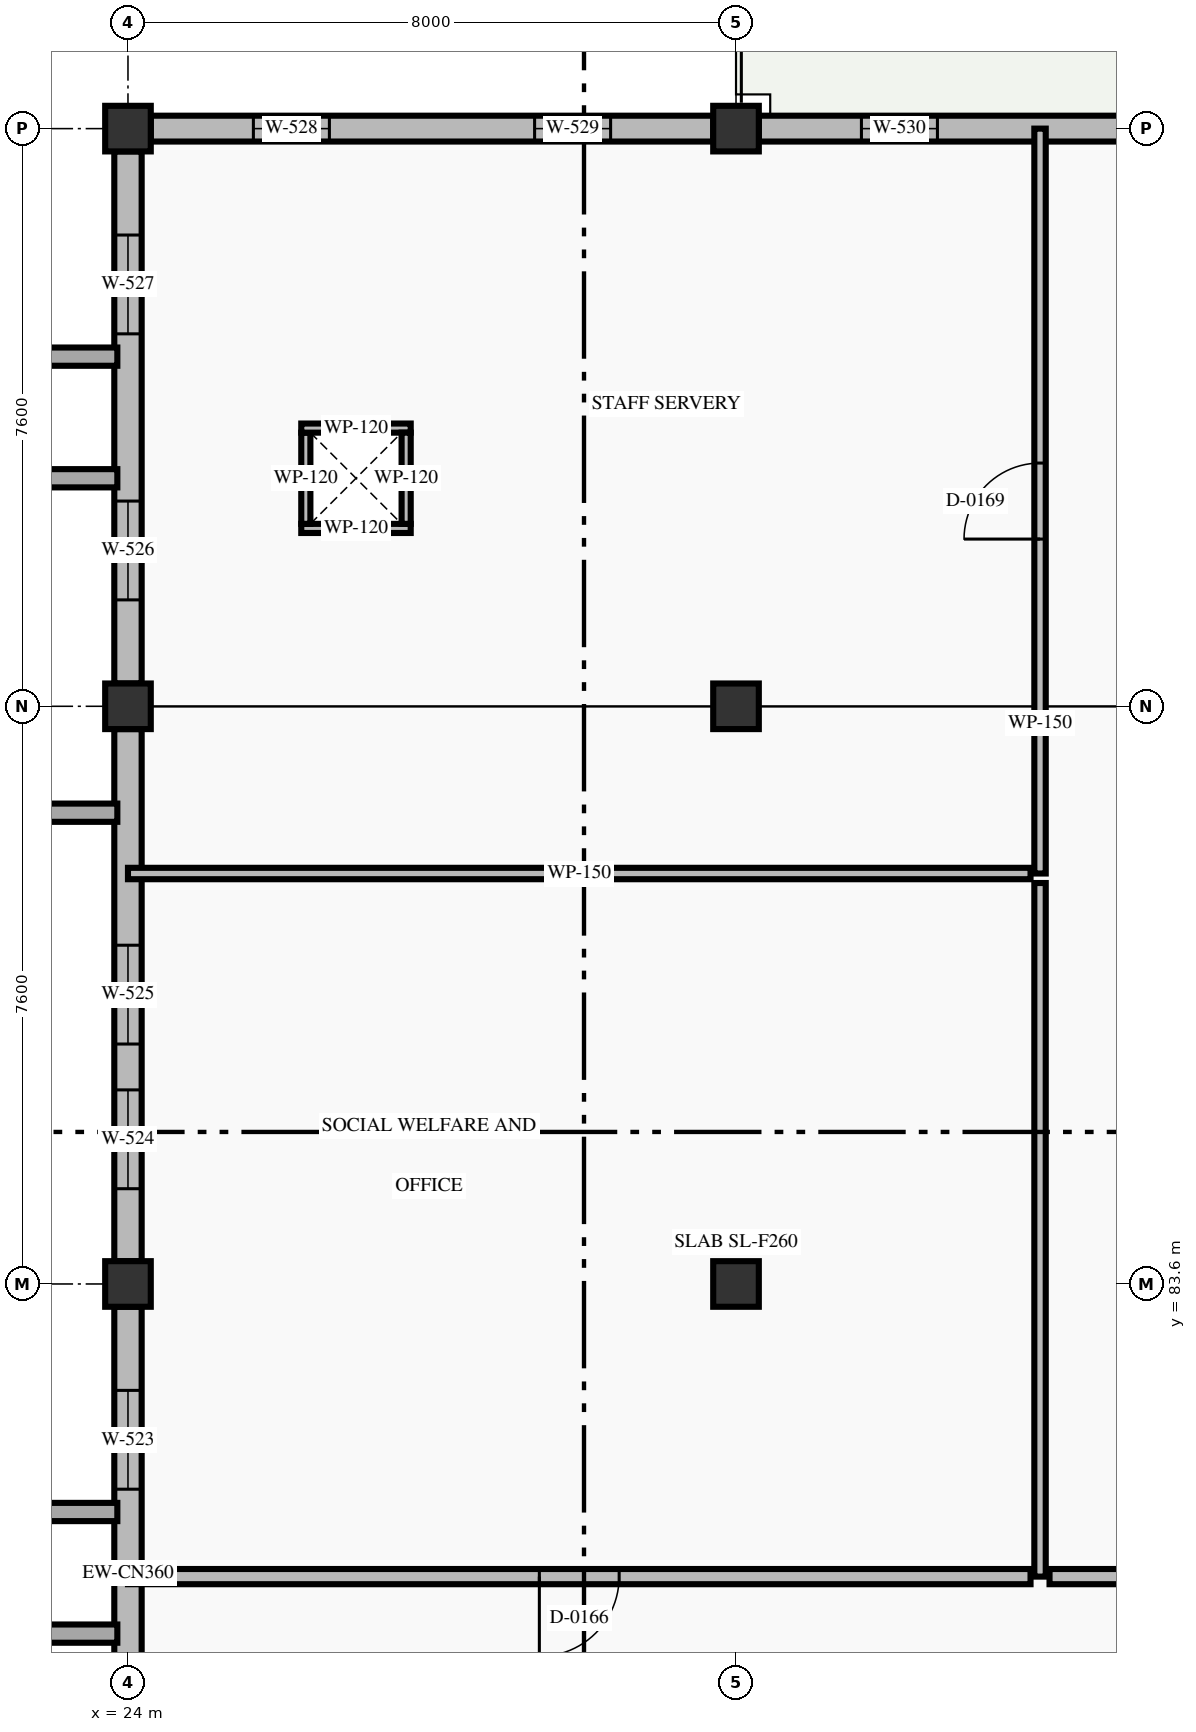
"""IFC4 building model, lengths in metres.
Left out: names, types, materials, properties, quantities, classifications, styles, units other than length and angle.
Written with IfcOpenShell. Run it as: python <this file> out.ifc"""

import sys

from ifc_helpers import new_model, si_unit, direction, frame, frame_2d, origin, origin_2d, place, context, subcontext, project, spatial, rectangle, extrude, element, fill, save


model = new_model("IFC4")
c1 = context("Model", 3, precision=1e-05, world=origin(), true_north=direction((0.0, 1.0)))
c2 = subcontext(c1, "Body", "Model", "MODEL_VIEW")
j1 = project(units=[si_unit("LENGTHUNIT", "METRE"), si_unit("PLANEANGLEUNIT", "RADIAN")], contexts=[c1])
p1 = place(None, origin())
s1 = spatial("IfcSite", under=j1, at=p1, CompositionType="ELEMENT")
p2 = place(p1, origin())
s2 = spatial("IfcBuilding", under=s1, at=p2, CompositionType="ELEMENT")
p3 = place(p2, frame((0.0, 0.0, 18.9)))
s3 = spatial("IfcBuildingStorey", under=s2, at=p3, CompositionType="ELEMENT", Elevation=18.9)
for number, where, z_axis, x_axis in (
    (1, (24.0, 83.6, 0.0), (0.0, 0.0, 1.0), (1.0, 0.0, 0.0)),
    (2, (24.0, 91.2, 0.0), (0.0, 0.0, 1.0), (1.0, 0.0, 0.0)),
    (3, (24.0, 98.8, 0.0), (0.0, 0.0, 1.0), (1.0, 0.0, 0.0)),
    (4, (32.0, 83.6, 0.0), (0.0, 0.0, 1.0), (1.0, 0.0, 0.0)),
    (5, (32.0, 91.2, 0.0), (0.0, 0.0, 1.0), (1.0, 0.0, 0.0)),
    (6, (32.0, 98.8, 0.0), (0.0, 0.0, 1.0), (1.0, 0.0, 0.0)),
):
    element("IfcColumn", number, at=place(p3, frame(where, z_axis=z_axis, x_axis=x_axis)), inside=s3, PredefinedType="COLUMN", context=c2, shape_type="SweptSolid", body=[
        extrude(rectangle(XDim=0.6, YDim=0.6, at=origin_2d()), origin(), (0.0, 0.0, 1.0), 4.8),
    ])
p4 = place(p3, frame((24.0, 76.3, 0.0), z_axis=(0.0, 0.0, 1.0), x_axis=(0.0, 1.0, 0.0)))
e7 = element("IfcWall", 7, at=p4, inside=s3, PredefinedType="STANDARD", context=c2, shape_type="SweptSolid", body=[
    extrude(rectangle(XDim=7.0, YDim=0.36, at=frame_2d((3.5, 0.0))), origin(), (0.0, 0.0, 1.0), 3.97),
])
p5 = place(p4, frame((1.1, 0.0, 0.9)))
e8 = element("IfcOpeningElement", 8, at=p5, cuts=e7, PredefinedType="OPENING", context=c2, shape_type="SweptSolid", body=[
    extrude(rectangle(XDim=1.3, YDim=1.75, at=frame_2d((0.65, 0.875))), frame((0.0, 0.19, 0.0), z_axis=(0.0, -1.0, 0.0), x_axis=(1.0, 0.0, 0.0)), (0.0, 0.0, 1.0), 0.38),
])
p6 = place(p4, frame((4.6, 0.0, 0.9)))
e9 = element("IfcOpeningElement", 9, at=p6, cuts=e7, PredefinedType="OPENING", context=c2, shape_type="SweptSolid", body=[
    extrude(rectangle(XDim=1.3, YDim=1.75, at=frame_2d((0.65, 0.875))), frame((0.0, 0.19, 0.0), z_axis=(0.0, -1.0, 0.0), x_axis=(1.0, 0.0, 0.0)), (0.0, 0.0, 1.0), 0.38),
])
p7 = place(p3, frame((24.0, 83.9, 0.0), z_axis=(0.0, 0.0, 1.0), x_axis=(0.0, 1.0, 0.0)))
e10 = element("IfcWall", 10, at=p7, inside=s3, PredefinedType="STANDARD", context=c2, shape_type="SweptSolid", body=[
    extrude(rectangle(XDim=7.0, YDim=0.36, at=frame_2d((3.5, 0.0))), origin(), (0.0, 0.0, 1.0), 3.97),
])
p8 = place(p7, frame((0.953, 0.0, 0.9)))
e11 = element("IfcOpeningElement", 11, at=p8, cuts=e10, PredefinedType="OPENING", context=c2, shape_type="SweptSolid", body=[
    extrude(rectangle(XDim=1.3, YDim=1.75, at=frame_2d((0.65, 0.875))), frame((0.0, 0.19, 0.0), z_axis=(0.0, -1.0, 0.0), x_axis=(1.0, 0.0, 0.0)), (0.0, 0.0, 1.0), 0.38),
])
p9 = place(p7, frame((2.857, 0.0, 0.9)))
e12 = element("IfcOpeningElement", 12, at=p9, cuts=e10, PredefinedType="OPENING", context=c2, shape_type="SweptSolid", body=[
    extrude(rectangle(XDim=1.3, YDim=1.75, at=frame_2d((0.65, 0.875))), frame((0.0, 0.19, 0.0), z_axis=(0.0, -1.0, 0.0), x_axis=(1.0, 0.0, 0.0)), (0.0, 0.0, 1.0), 0.38),
])
p10 = place(p3, frame((24.0, 91.5, 0.0), z_axis=(0.0, 0.0, 1.0), x_axis=(0.0, 1.0, 0.0)))
e13 = element("IfcWall", 13, at=p10, inside=s3, PredefinedType="STANDARD", context=c2, shape_type="SweptSolid", body=[
    extrude(rectangle(XDim=7.0, YDim=0.36, at=frame_2d((3.5, 0.0))), origin(), (0.0, 0.0, 1.0), 3.97),
])
p11 = place(p10, frame((1.1, 0.0, 0.9)))
e14 = element("IfcOpeningElement", 14, at=p11, cuts=e13, PredefinedType="OPENING", context=c2, shape_type="SweptSolid", body=[
    extrude(rectangle(XDim=1.3, YDim=1.75, at=frame_2d((0.65, 0.875))), frame((0.0, 0.19, 0.0), z_axis=(0.0, -1.0, 0.0), x_axis=(1.0, 0.0, 0.0)), (0.0, 0.0, 1.0), 0.38),
])
p12 = place(p10, frame((4.6, 0.0, 0.9)))
e15 = element("IfcOpeningElement", 15, at=p12, cuts=e13, PredefinedType="OPENING", context=c2, shape_type="SweptSolid", body=[
    extrude(rectangle(XDim=1.3, YDim=1.75, at=frame_2d((0.65, 0.875))), frame((0.0, 0.19, 0.0), z_axis=(0.0, -1.0, 0.0), x_axis=(1.0, 0.0, 0.0)), (0.0, 0.0, 1.0), 0.38),
])
p13 = place(p3, frame((24.3, 98.8, 0.0), z_axis=(0.0, 0.0, 1.0), x_axis=(1.0, 0.0, 0.0)))
e16 = element("IfcWall", 16, at=p13, inside=s3, PredefinedType="STANDARD", context=c2, shape_type="SweptSolid", body=[
    extrude(rectangle(XDim=7.4, YDim=0.34, at=frame_2d((3.7, 0.0))), origin(), (0.0, 0.0, 1.0), 3.92),
])
p14 = place(p13, frame((1.35, 0.0, 1.05)))
e17 = element("IfcOpeningElement", 17, at=p14, cuts=e16, PredefinedType="OPENING", context=c2, shape_type="SweptSolid", body=[
    extrude(rectangle(XDim=1.0, YDim=1.35, at=frame_2d((0.5, 0.675))), frame((0.0, 0.18, 0.0), z_axis=(0.0, -1.0, 0.0), x_axis=(1.0, 0.0, 0.0)), (0.0, 0.0, 1.0), 0.36),
])
p15 = place(p13, frame((5.05, 0.0, 1.05)))
e18 = element("IfcOpeningElement", 18, at=p15, cuts=e16, PredefinedType="OPENING", context=c2, shape_type="SweptSolid", body=[
    extrude(rectangle(XDim=1.0, YDim=1.35, at=frame_2d((0.5, 0.675))), frame((0.0, 0.18, 0.0), z_axis=(0.0, -1.0, 0.0), x_axis=(1.0, 0.0, 0.0)), (0.0, 0.0, 1.0), 0.36),
])
p16 = place(p3, frame((32.3, 98.8, 0.0), z_axis=(0.0, 0.0, 1.0), x_axis=(1.0, 0.0, 0.0)))
e19 = element("IfcWall", 19, at=p16, inside=s3, PredefinedType="STANDARD", context=c2, shape_type="SweptSolid", body=[
    extrude(rectangle(XDim=7.4, YDim=0.34, at=frame_2d((3.7, 0.0))), origin(), (0.0, 0.0, 1.0), 3.92),
])
p17 = place(p16, frame((1.35, 0.0, 1.05)))
e20 = element("IfcOpeningElement", 20, at=p17, cuts=e19, PredefinedType="OPENING", context=c2, shape_type="SweptSolid", body=[
    extrude(rectangle(XDim=1.0, YDim=1.35, at=frame_2d((0.5, 0.675))), frame((0.0, 0.18, 0.0), z_axis=(0.0, -1.0, 0.0), x_axis=(1.0, 0.0, 0.0)), (0.0, 0.0, 1.0), 0.36),
])
p18 = place(p16, frame((5.05, 0.0, 1.05)))
e21 = element("IfcOpeningElement", 21, at=p18, cuts=e19, PredefinedType="OPENING", context=c2, shape_type="SweptSolid", body=[
    extrude(rectangle(XDim=1.0, YDim=1.35, at=frame_2d((0.5, 0.675))), frame((0.0, 0.18, 0.0), z_axis=(0.0, -1.0, 0.0), x_axis=(1.0, 0.0, 0.0)), (0.0, 0.0, 1.0), 0.36),
])
p19 = place(p3, frame((27.72, 93.54, 0.0), z_axis=(0.0, 0.0, 1.0), x_axis=(-1.0, 0.0, 0.0)))
e22 = element("IfcWall", 22, at=p19, inside=s3, PredefinedType="PARTITIONING", context=c2, shape_type="SweptSolid", body=[
    extrude(rectangle(XDim=1.44, YDim=0.12, at=frame_2d((0.72, 0.0))), origin(), (0.0, 0.0, 1.0), 4.57),
])
p20 = place(p3, frame((26.34, 93.6, 0.0), z_axis=(0.0, 0.0, 1.0), x_axis=(0.0, 1.0, 0.0)))
e23 = element("IfcWall", 23, at=p20, inside=s3, PredefinedType="PARTITIONING", context=c2, shape_type="SweptSolid", body=[
    extrude(rectangle(XDim=1.2, YDim=0.12, at=frame_2d((0.6, 0.0))), origin(), (0.0, 0.0, 1.0), 4.57),
])
p21 = place(p3, frame((26.28, 94.86, 0.0), z_axis=(0.0, 0.0, 1.0), x_axis=(1.0, 0.0, 0.0)))
e24 = element("IfcWall", 24, at=p21, inside=s3, PredefinedType="PARTITIONING", context=c2, shape_type="SweptSolid", body=[
    extrude(rectangle(XDim=1.44, YDim=0.12, at=frame_2d((0.72, 0.0))), origin(), (0.0, 0.0, 1.0), 4.57),
])
p22 = place(p3, frame((27.66, 94.8, 0.0), z_axis=(0.0, 0.0, 1.0), x_axis=(0.0, -1.0, 0.0)))
e25 = element("IfcWall", 25, at=p22, inside=s3, PredefinedType="PARTITIONING", context=c2, shape_type="SweptSolid", body=[
    extrude(rectangle(XDim=1.2, YDim=0.12, at=frame_2d((0.6, 0.0))), origin(), (0.0, 0.0, 1.0), 4.57),
])
p23 = place(p3, frame((36.0, 89.0, 0.0), z_axis=(0.0, 0.0, 1.0), x_axis=(0.0, 1.0, 0.0)))
e26 = element("IfcWall", 26, at=p23, inside=s3, PredefinedType="PARTITIONING", context=c2, shape_type="SweptSolid", body=[
    extrude(rectangle(XDim=9.8, YDim=0.15, at=frame_2d((4.9, 0.0))), origin(), (0.0, 0.0, 1.0), 4.07),
])
p24 = place(p23, frame((4.4, 0.0, 0.0)))
e27 = element("IfcOpeningElement", 27, at=p24, cuts=e26, PredefinedType="OPENING", context=c2, shape_type="SweptSolid", body=[
    extrude(rectangle(XDim=1.0, YDim=2.15, at=frame_2d((0.5, 1.075))), frame((0.0, 0.085, 0.0), z_axis=(0.0, -1.0, 0.0), x_axis=(1.0, 0.0, 0.0)), (0.0, 0.0, 1.0), 0.17),
])
p25 = place(p3, frame((36.0, 79.75, 0.0), z_axis=(0.0, 0.0, 1.0), x_axis=(0.0, 1.0, 0.0)))
e28 = element("IfcWall", 28, at=p25, inside=s3, PredefinedType="PARTITIONING", context=c2, shape_type="SweptSolid", body=[
    extrude(rectangle(XDim=9.125, YDim=0.15, at=frame_2d((4.562, 0.0))), origin(), (0.0, 0.0, 1.0), 4.07),
])
p26 = place(p3, frame((48.47, 79.75, 0.0), z_axis=(0.0, 0.0, 1.0), x_axis=(-1.0, 0.0, 0.0)))
e29 = element("IfcWall", 29, at=p26, inside=s3, PredefinedType="STANDARD", context=c2, shape_type="SweptSolid", body=[
    extrude(rectangle(XDim=12.345, YDim=0.2, at=frame_2d((6.172, 0.0))), origin(), (0.0, 0.0, 1.0), 4.57),
])
p27 = place(p26, frame((5.333, 0.0, 0.0)))
e30 = element("IfcOpeningElement", 30, at=p27, cuts=e29, PredefinedType="OPENING", context=c2, shape_type="SweptSolid", body=[
    extrude(rectangle(XDim=1.68, YDim=2.34, at=frame_2d((0.84, 1.17))), frame((0.0, 0.11, 0.0), z_axis=(0.0, -1.0, 0.0), x_axis=(1.0, 0.0, 0.0)), (0.0, 0.0, 1.0), 0.22),
])
p28 = place(p26, frame((7.333, 0.0, 0.0)))
e31 = element("IfcOpeningElement", 31, at=p28, cuts=e29, PredefinedType="OPENING", context=c2, shape_type="SweptSolid", body=[
    extrude(rectangle(XDim=1.68, YDim=2.34, at=frame_2d((0.84, 1.17))), frame((0.0, 0.11, 0.0), z_axis=(0.0, -1.0, 0.0), x_axis=(1.0, 0.0, 0.0)), (0.0, 0.0, 1.0), 0.22),
])
p29 = place(p3, frame((35.875, 89.0, 0.0), z_axis=(0.0, 0.0, 1.0), x_axis=(-1.0, 0.0, 0.0)))
e32 = element("IfcWall", 32, at=p29, inside=s3, PredefinedType="PARTITIONING", context=c2, shape_type="SweptSolid", body=[
    extrude(rectangle(XDim=11.875, YDim=0.15, at=frame_2d((5.938, 0.0))), origin(), (0.0, 0.0, 1.0), 4.57),
])
p30 = place(p3, frame((35.875, 79.75, 0.0), z_axis=(0.0, 0.0, 1.0), x_axis=(-1.0, 0.0, 0.0)))
e33 = element("IfcWall", 33, at=p30, inside=s3, PredefinedType="STANDARD", context=c2, shape_type="SweptSolid", body=[
    extrude(rectangle(XDim=11.875, YDim=0.2, at=frame_2d((5.938, 0.0))), origin(), (0.0, 0.0, 1.0), 4.57),
])
p31 = place(p30, frame((5.413, 0.0, 0.0)))
e34 = element("IfcOpeningElement", 34, at=p31, cuts=e33, PredefinedType="OPENING", context=c2, shape_type="SweptSolid", body=[
    extrude(rectangle(XDim=1.05, YDim=2.15, at=frame_2d((0.525, 1.075))), frame((0.0, 0.11, 0.0), z_axis=(0.0, -1.0, 0.0), x_axis=(1.0, 0.0, 0.0)), (0.0, 0.0, 1.0), 0.22),
])
p32 = place(p6, origin())
e35 = element("IfcWindow", 35, at=p32, inside=s3, PartitioningType="SINGLE_PANEL", PredefinedType="WINDOW", context=c2, shape_type="SweptSolid", body=[
    extrude(rectangle(XDim=1.3, YDim=1.75, at=frame_2d((0.65, 0.875))), frame((0.0, 0.03, 0.0), z_axis=(0.0, -1.0, 0.0), x_axis=(1.0, 0.0, 0.0)), (0.0, 0.0, 1.0), 0.06),
])
fill(e9, e35)
p33 = place(p8, origin())
e36 = element("IfcWindow", 36, at=p33, inside=s3, PartitioningType="SINGLE_PANEL", PredefinedType="WINDOW", context=c2, shape_type="SweptSolid", body=[
    extrude(rectangle(XDim=1.3, YDim=1.75, at=frame_2d((0.65, 0.875))), frame((0.0, 0.03, 0.0), z_axis=(0.0, -1.0, 0.0), x_axis=(1.0, 0.0, 0.0)), (0.0, 0.0, 1.0), 0.06),
])
fill(e11, e36)
p34 = place(p9, origin())
e37 = element("IfcWindow", 37, at=p34, inside=s3, PartitioningType="SINGLE_PANEL", PredefinedType="WINDOW", context=c2, shape_type="SweptSolid", body=[
    extrude(rectangle(XDim=1.3, YDim=1.75, at=frame_2d((0.65, 0.875))), frame((0.0, 0.03, 0.0), z_axis=(0.0, -1.0, 0.0), x_axis=(1.0, 0.0, 0.0)), (0.0, 0.0, 1.0), 0.06),
])
fill(e12, e37)
p35 = place(p11, origin())
e38 = element("IfcWindow", 38, at=p35, inside=s3, PartitioningType="SINGLE_PANEL", PredefinedType="WINDOW", context=c2, shape_type="SweptSolid", body=[
    extrude(rectangle(XDim=1.3, YDim=1.75, at=frame_2d((0.65, 0.875))), frame((0.0, 0.03, 0.0), z_axis=(0.0, -1.0, 0.0), x_axis=(1.0, 0.0, 0.0)), (0.0, 0.0, 1.0), 0.06),
])
fill(e14, e38)
p36 = place(p12, origin())
e39 = element("IfcWindow", 39, at=p36, inside=s3, PartitioningType="SINGLE_PANEL", PredefinedType="WINDOW", context=c2, shape_type="SweptSolid", body=[
    extrude(rectangle(XDim=1.3, YDim=1.75, at=frame_2d((0.65, 0.875))), frame((0.0, 0.03, 0.0), z_axis=(0.0, -1.0, 0.0), x_axis=(1.0, 0.0, 0.0)), (0.0, 0.0, 1.0), 0.06),
])
fill(e15, e39)
p37 = place(p14, origin())
e40 = element("IfcWindow", 40, at=p37, inside=s3, PartitioningType="SINGLE_PANEL", PredefinedType="WINDOW", context=c2, shape_type="SweptSolid", body=[
    extrude(rectangle(XDim=1.0, YDim=1.35, at=frame_2d((0.5, 0.675))), frame((0.0, 0.03, 0.0), z_axis=(0.0, -1.0, 0.0), x_axis=(1.0, 0.0, 0.0)), (0.0, 0.0, 1.0), 0.06),
])
fill(e17, e40)
p38 = place(p15, origin())
e41 = element("IfcWindow", 41, at=p38, inside=s3, PartitioningType="SINGLE_PANEL", PredefinedType="WINDOW", context=c2, shape_type="SweptSolid", body=[
    extrude(rectangle(XDim=1.0, YDim=1.35, at=frame_2d((0.5, 0.675))), frame((0.0, 0.03, 0.0), z_axis=(0.0, -1.0, 0.0), x_axis=(1.0, 0.0, 0.0)), (0.0, 0.0, 1.0), 0.06),
])
fill(e18, e41)
p39 = place(p17, origin())
e42 = element("IfcWindow", 42, at=p39, inside=s3, PartitioningType="SINGLE_PANEL", PredefinedType="WINDOW", context=c2, shape_type="SweptSolid", body=[
    extrude(rectangle(XDim=1.0, YDim=1.35, at=frame_2d((0.5, 0.675))), frame((0.0, 0.03, 0.0), z_axis=(0.0, -1.0, 0.0), x_axis=(1.0, 0.0, 0.0)), (0.0, 0.0, 1.0), 0.06),
])
fill(e20, e42)
p40 = place(p31, origin())
e43 = element("IfcDoor", 43, at=p40, inside=s3, OperationType="SINGLE_SWING_RIGHT", PredefinedType="DOOR", context=c2, shape_type="SweptSolid", body=[
    extrude(rectangle(XDim=1.05, YDim=2.15, at=frame_2d((0.525, 1.075))), frame((0.0, 0.025, 0.0), z_axis=(0.0, -1.0, 0.0), x_axis=(1.0, 0.0, 0.0)), (0.0, 0.0, 1.0), 0.05),
])
fill(e34, e43)
p41 = place(p24, origin())
e44 = element("IfcDoor", 44, at=p41, inside=s3, OperationType="SINGLE_SWING_LEFT", PredefinedType="DOOR", context=c2, shape_type="SweptSolid", body=[
    extrude(rectangle(XDim=1.0, YDim=2.15, at=frame_2d((0.5, 1.075))), frame((0.0, 0.025, 0.0), z_axis=(0.0, -1.0, 0.0), x_axis=(1.0, 0.0, 0.0)), (0.0, 0.0, 1.0), 0.05),
])
fill(e27, e44)
save(model, sys.argv[1])
